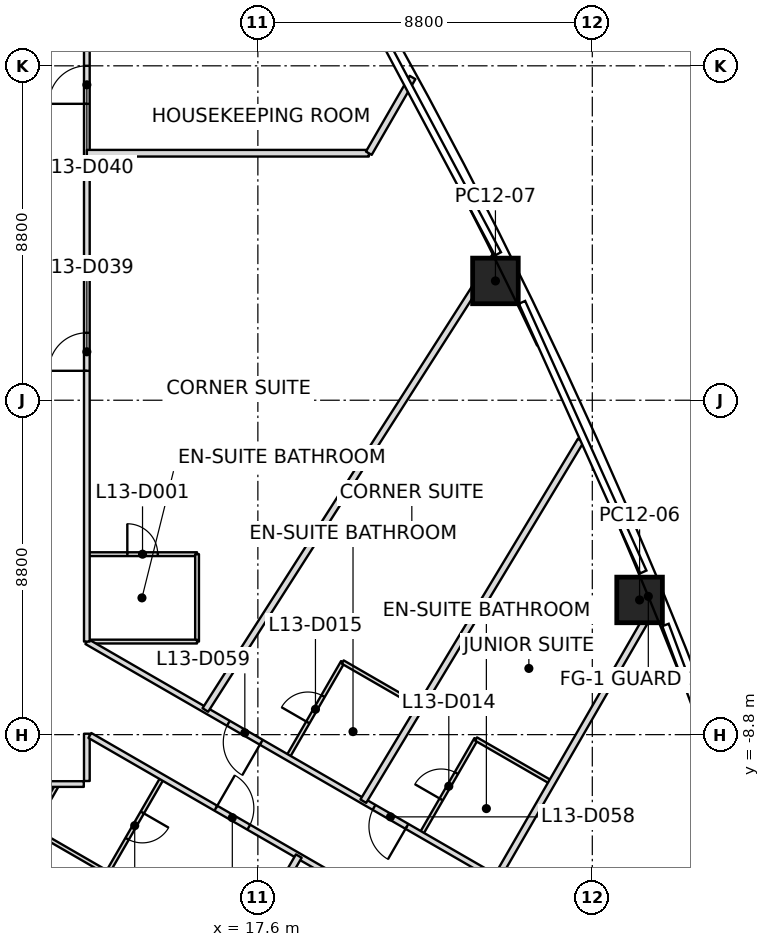
"""IFC4 building model, lengths in metres.
Left out: names, types, materials, properties, quantities, classifications, styles, units other than length and angle.
Written with IfcOpenShell. Run it as: python <this file> out.ifc"""

import sys

from ifc_helpers import new_model, si_unit, direction, frame, frame_2d, origin, origin_2d, place, context, subcontext, project, spatial, rectangle, extrude, element, fill, save


model = new_model("IFC4")
c1 = context("Model", 3, precision=1e-05, world=origin(), true_north=direction((0.0, 1.0)))
c2 = subcontext(c1, "Body", "Model", "MODEL_VIEW")
j1 = project(units=[si_unit("LENGTHUNIT", "METRE"), si_unit("PLANEANGLEUNIT", "RADIAN")], contexts=[c1])
p1 = place(None, origin())
s1 = spatial("IfcSite", under=j1, at=p1, CompositionType="ELEMENT")
p2 = place(p1, origin())
s2 = spatial("IfcBuilding", under=s1, at=p2, CompositionType="ELEMENT")
p3 = place(p2, frame((0.0, 0.0, 70.2)))
s3 = spatial("IfcBuildingStorey", under=s2, at=p3, CompositionType="ELEMENT", Elevation=70.2)
p4 = place(p3, frame((27.644, -5.255, 0.0), z_axis=(-0.019460655113, 0.011016709844, 0.999749926235), x_axis=(-0.381333758454, 0.9242697276, -0.017607819416)))
e1 = element("IfcColumn", 1, at=p4, inside=s3, PredefinedType="COLUMN", context=c2, shape_type="SweptSolid", body=[
    extrude(rectangle(XDim=1.2, YDim=1.2, at=origin_2d()), origin(), (0.0, 0.0, 1.0), 3.701),
])
p5 = place(p3, frame((23.851, 3.139, 0.0), z_axis=(-0.015306644787, 0.002309192102, 0.99988017995), x_axis=(-0.441616967633, 0.897160209643, -0.00883244763)))
e2 = element("IfcColumn", 2, at=p5, inside=s3, PredefinedType="COLUMN", context=c2, shape_type="SweptSolid", body=[
    extrude(rectangle(XDim=1.2, YDim=1.2, at=origin_2d()), origin(), (0.0, 0.0, 1.0), 3.7),
])
p6 = place(p3, frame((18.677, -11.995, 0.0), z_axis=(0.0, 0.0, 1.0), x_axis=(-0.499997843529, -0.86602664882, 0.0)))
e3 = element("IfcWall", 3, at=p6, inside=s3, PredefinedType="PARTITIONING", context=c2, shape_type="SweptSolid", body=[
    extrude(rectangle(XDim=11.153, YDim=0.175, at=frame_2d((5.576, 0.0))), origin(), (0.0, 0.0, 1.0), 3.0),
])
p7 = place(p3, frame((13.1, 6.5, 0.0), z_axis=(0.0, 0.0, 1.0), x_axis=(1.0, 0.0, 0.0)))
e4 = element("IfcWall", 4, at=p7, inside=s3, PredefinedType="PARTITIONING", context=c2, shape_type="SweptSolid", body=[
    extrude(rectangle(XDim=7.419, YDim=0.175, at=frame_2d((3.709, 0.0))), origin(), (0.0, 0.0, 1.0), 3.0),
])
p8 = place(p3, frame((20.519, 6.5, 0.0), z_axis=(0.0, 0.0, 1.0), x_axis=(0.500040764516, 0.866001867101, 0.0)))
e5 = element("IfcWall", 5, at=p8, inside=s3, PredefinedType="PARTITIONING", context=c2, shape_type="SweptSolid", body=[
    extrude(rectangle(XDim=2.302, YDim=0.175, at=frame_2d((1.151, 0.0))), origin(), (0.0, 0.0, 1.0), 2.934),
])
p9 = place(p3, frame((23.851, 3.796, 0.0), z_axis=(0.0, 0.0, 1.0), x_axis=(-0.538388937406, -0.84269647684, 0.0)))
e6 = element("IfcWall", 6, at=p9, inside=s3, PredefinedType="PARTITIONING", context=c2, shape_type="SweptSolid", body=[
    extrude(rectangle(XDim=14.177, YDim=0.175, at=frame_2d((7.089, 0.0))), origin(), (0.0, 0.0, 1.0), 2.947),
])
p10 = place(p3, frame((20.375, -10.551, 0.0), z_axis=(0.0, 0.0, 1.0), x_axis=(0.51624063177, 0.856443582561, 0.0)))
e7 = element("IfcWall", 7, at=p10, inside=s3, PredefinedType="PARTITIONING", context=c2, shape_type="SweptSolid", body=[
    extrude(rectangle(XDim=11.084, YDim=0.175, at=frame_2d((5.542, 0.0))), origin(), (0.0, 0.0, 1.0), 2.934),
])
p11 = place(p3, frame((23.883, -12.577, 0.0), z_axis=(0.0, 0.0, 1.0), x_axis=(0.500021453979, 0.866013016969, 0.0)))
e8 = element("IfcWall", 8, at=p11, inside=s3, PredefinedType="PARTITIONING", context=c2, shape_type="SweptSolid", body=[
    extrude(rectangle(XDim=8.576, YDim=0.175, at=frame_2d((4.288, 0.0))), origin(), (0.0, 0.0, 1.0), 2.934),
])
p12 = place(p3, frame((-13.02, -10.1, 0.0), z_axis=(0.0, 0.0, 1.0), x_axis=(1.0, 0.0, 0.0)))
e9 = element("IfcWall", 9, at=p12, inside=s3, PredefinedType="PARTITIONING", context=c2, shape_type="SweptSolid", body=[
    extrude(rectangle(XDim=26.04, YDim=0.15, at=frame_2d((13.02, 0.0))), origin(), (0.0, 0.0, 1.0), 2.797),
])
p13 = place(p12, frame((7.32, 0.0, 0.0)))
e10 = element("IfcOpeningElement", 10, at=p13, cuts=e9, PredefinedType="OPENING", context=c2, shape_type="SweptSolid", body=[
    extrude(rectangle(XDim=1.0, YDim=2.1, at=frame_2d((0.5, 1.05))), frame((0.0, 0.075, 0.0), z_axis=(0.0, -1.0, 0.0), x_axis=(1.0, 0.0, 0.0)), (0.0, 0.0, 1.0), 0.15),
])
p14 = place(p12, frame((11.82, 0.0, 0.0)))
e11 = element("IfcOpeningElement", 11, at=p14, cuts=e9, PredefinedType="OPENING", context=c2, shape_type="SweptSolid", body=[
    extrude(rectangle(XDim=1.0, YDim=2.1, at=frame_2d((0.5, 1.05))), frame((0.0, 0.075, 0.0), z_axis=(0.0, -1.0, 0.0), x_axis=(1.0, 0.0, 0.0)), (0.0, 0.0, 1.0), 0.15),
])
p15 = place(p12, frame((14.82, 0.0, 0.0)))
e12 = element("IfcOpeningElement", 12, at=p15, cuts=e9, PredefinedType="OPENING", context=c2, shape_type="SweptSolid", body=[
    extrude(rectangle(XDim=1.0, YDim=2.1, at=frame_2d((0.5, 1.05))), frame((0.0, 0.075, 0.0), z_axis=(0.0, -1.0, 0.0), x_axis=(1.0, 0.0, 0.0)), (0.0, 0.0, 1.0), 0.15),
])
p16 = place(p12, frame((19.92, 0.0, 0.0)))
e13 = element("IfcOpeningElement", 13, at=p16, cuts=e9, PredefinedType="OPENING", context=c2, shape_type="SweptSolid", body=[
    extrude(rectangle(XDim=1.0, YDim=2.1, at=frame_2d((0.5, 1.05))), frame((0.0, 0.075, 0.0), z_axis=(0.0, -1.0, 0.0), x_axis=(1.0, 0.0, 0.0)), (0.0, 0.0, 1.0), 0.15),
])
p17 = place(p3, frame((13.1, -10.02, 0.0), z_axis=(0.0, 0.0, 1.0), x_axis=(0.0, 1.0, 0.0)))
e14 = element("IfcWall", 14, at=p17, inside=s3, PredefinedType="PARTITIONING", context=c2, shape_type="SweptSolid", body=[
    extrude(rectangle(XDim=1.244, YDim=0.15, at=frame_2d((0.622, 0.0))), origin(), (0.0, 0.0, 1.0), 2.797),
])
p18 = place(p3, frame((13.179, -8.822, 0.0), z_axis=(0.0, 0.0, 1.0), x_axis=(0.866032412198, -0.499987860876, 0.0)))
e15 = element("IfcWall", 15, at=p18, inside=s3, PredefinedType="PARTITIONING", context=c2, shape_type="SweptSolid", body=[
    extrude(rectangle(XDim=11.148, YDim=0.15, at=frame_2d((5.574, 0.0))), origin(), (0.0, 0.0, 1.0), 2.797),
])
p19 = place(p18, frame((3.828, 0.0, 0.0)))
e16 = element("IfcOpeningElement", 16, at=p19, cuts=e15, PredefinedType="OPENING", context=c2, shape_type="SweptSolid", body=[
    extrude(rectangle(XDim=1.0, YDim=2.1, at=frame_2d((0.5, 1.05))), frame((0.0, 0.075, 0.0), z_axis=(0.0, -1.0, 0.0), x_axis=(1.0, 0.0, 0.0)), (0.0, 0.0, 1.0), 0.15),
])
p20 = place(p18, frame((9.448, 0.0, 0.0)))
e17 = element("IfcOpeningElement", 17, at=p20, cuts=e15, PredefinedType="OPENING", context=c2, shape_type="SweptSolid", body=[
    extrude(rectangle(XDim=1.0, YDim=2.1, at=frame_2d((0.5, 1.05))), frame((0.0, 0.075, 0.0), z_axis=(0.0, -1.0, 0.0), x_axis=(1.0, 0.0, 0.0)), (0.0, 0.0, 1.0), 0.15),
])
p21 = place(p3, frame((23.814, -12.537, 0.0), z_axis=(0.0, 0.0, 1.0), x_axis=(-0.86602554532, 0.499999754854, 0.0)))
e18 = element("IfcWall", 18, at=p21, inside=s3, PredefinedType="PARTITIONING", context=c2, shape_type="SweptSolid", body=[
    extrude(rectangle(XDim=12.372, YDim=0.15, at=frame_2d((6.186, 0.0))), origin(), (0.0, 0.0, 1.0), 2.947),
])
p22 = place(p21, frame((2.646, 0.0, 0.0)))
e19 = element("IfcOpeningElement", 19, at=p22, cuts=e18, PredefinedType="OPENING", context=c2, shape_type="SweptSolid", body=[
    extrude(rectangle(XDim=1.0, YDim=2.1, at=frame_2d((0.5, 1.05))), frame((0.0, 0.075, 0.0), z_axis=(0.0, -1.0, 0.0), x_axis=(1.0, 0.0, 0.0)), (0.0, 0.0, 1.0), 0.15),
])
p23 = place(p21, frame((7.072, 0.0, 0.0)))
e20 = element("IfcOpeningElement", 20, at=p23, cuts=e18, PredefinedType="OPENING", context=c2, shape_type="SweptSolid", body=[
    extrude(rectangle(XDim=1.0, YDim=2.1, at=frame_2d((0.5, 1.05))), frame((0.0, 0.075, 0.0), z_axis=(0.0, -1.0, 0.0), x_axis=(1.0, 0.0, 0.0)), (0.0, 0.0, 1.0), 0.15),
])
p24 = place(p3, frame((13.1, -6.351, 0.0), z_axis=(0.0, 0.0, 1.0), x_axis=(0.0, 1.0, 0.0)))
e21 = element("IfcWall", 21, at=p24, inside=s3, PredefinedType="PARTITIONING", context=c2, shape_type="SweptSolid", body=[
    extrude(rectangle(XDim=16.371, YDim=0.15, at=frame_2d((8.186, 0.0))), origin(), (0.0, 0.0, 1.0), 3.0),
])
p25 = place(p24, frame((7.125, 0.0, 0.0)))
e22 = element("IfcOpeningElement", 22, at=p25, cuts=e21, PredefinedType="OPENING", context=c2, shape_type="SweptSolid", body=[
    extrude(rectangle(XDim=1.0, YDim=2.1, at=frame_2d((0.5, 1.05))), frame((0.0, 0.075, 0.0), z_axis=(0.0, -1.0, 0.0), x_axis=(1.0, 0.0, 0.0)), (0.0, 0.0, 1.0), 0.15),
])
p26 = place(p24, frame((14.151, 0.0, 0.0)))
e23 = element("IfcOpeningElement", 23, at=p26, cuts=e21, PredefinedType="OPENING", context=c2, shape_type="SweptSolid", body=[
    extrude(rectangle(XDim=1.0, YDim=2.1, at=frame_2d((0.5, 1.05))), frame((0.0, 0.075, 0.0), z_axis=(0.0, -1.0, 0.0), x_axis=(1.0, 0.0, 0.0)), (0.0, 0.0, 1.0), 0.15),
])
p27 = place(p3, frame((15.077, -9.952, 0.0), z_axis=(0.0, 0.0, 1.0), x_axis=(-0.499999802827, -0.866025517622, 0.0)))
e24 = element("IfcWall", 24, at=p27, inside=s3, PredefinedType="PARTITIONING", context=c2, shape_type="SweptSolid", body=[
    extrude(rectangle(XDim=2.87, YDim=0.1, at=frame_2d((1.435, 0.0))), origin(), (0.0, 0.0, 1.0), 2.797),
])
p28 = place(p27, frame((1.035, 0.0, 0.0)))
e25 = element("IfcOpeningElement", 25, at=p28, cuts=e24, PredefinedType="OPENING", context=c2, shape_type="SweptSolid", body=[
    extrude(rectangle(XDim=0.8, YDim=2.1, at=frame_2d((0.4, 1.05))), frame((0.0, 0.05, 0.0), z_axis=(0.0, -1.0, 0.0), x_axis=(1.0, 0.0, 0.0)), (0.0, 0.0, 1.0), 0.1),
])
p29 = place(p3, frame((13.642, -12.437, 0.0), z_axis=(0.0, 0.0, 1.0), x_axis=(-0.866007057882, 0.500031774688, 0.0)))
e26 = element("IfcWall", 26, at=p29, inside=s3, PredefinedType="PARTITIONING", context=c2, shape_type="SweptSolid", body=[
    extrude(rectangle(XDim=2.3, YDim=0.1, at=frame_2d((1.15, 0.0))), origin(), (0.0, 0.0, 1.0), 2.867),
])
p30 = place(p3, frame((11.65, -11.287, 0.0), z_axis=(0.0, 0.0, 1.0), x_axis=(0.500049290317, 0.865996944136, 0.0)))
e27 = element("IfcWall", 27, at=p30, inside=s3, PredefinedType="PARTITIONING", context=c2, shape_type="SweptSolid", body=[
    extrude(rectangle(XDim=1.336, YDim=0.1, at=frame_2d((0.668, 0.0))), origin(), (0.0, 0.0, 1.0), 3.0),
])
p31 = place(p3, frame((13.13, -4.051, 0.0), z_axis=(0.0, 0.0, 1.0), x_axis=(1.0, 0.0, 0.0)))
e28 = element("IfcWall", 28, at=p31, inside=s3, PredefinedType="PARTITIONING", context=c2, shape_type="SweptSolid", body=[
    extrude(rectangle(XDim=2.87, YDim=0.1, at=frame_2d((1.435, 0.0))), origin(), (0.0, 0.0, 1.0), 3.0),
])
p32 = place(p31, frame((1.035, 0.0, 0.0)))
e29 = element("IfcOpeningElement", 29, at=p32, cuts=e28, PredefinedType="OPENING", context=c2, shape_type="SweptSolid", body=[
    extrude(rectangle(XDim=0.8, YDim=2.1, at=frame_2d((0.4, 1.05))), frame((0.0, 0.05, 0.0), z_axis=(0.0, -1.0, 0.0), x_axis=(1.0, 0.0, 0.0)), (0.0, 0.0, 1.0), 0.1),
])
p33 = place(p3, frame((16.0, -4.051, 0.0), z_axis=(0.0, 0.0, 1.0), x_axis=(0.0, -1.0, 0.0)))
e30 = element("IfcWall", 30, at=p33, inside=s3, PredefinedType="PARTITIONING", context=c2, shape_type="SweptSolid", body=[
    extrude(rectangle(XDim=2.3, YDim=0.1, at=frame_2d((1.15, 0.0))), origin(), (0.0, 0.0, 1.0), 2.947),
])
p34 = place(p3, frame((16.0, -6.351, 0.0), z_axis=(0.0, 0.0, 1.0), x_axis=(-1.0, 0.0, 0.0)))
e31 = element("IfcWall", 31, at=p34, inside=s3, PredefinedType="PARTITIONING", context=c2, shape_type="SweptSolid", body=[
    extrude(rectangle(XDim=2.84, YDim=0.1, at=frame_2d((1.42, 0.0))), origin(), (0.0, 0.0, 1.0), 2.947),
])
p35 = place(p3, frame((18.398, -9.375, 0.0), z_axis=(0.0, 0.0, 1.0), x_axis=(0.499999802827, 0.866025517622, 0.0)))
e32 = element("IfcWall", 32, at=p35, inside=s3, PredefinedType="PARTITIONING", context=c2, shape_type="SweptSolid", body=[
    extrude(rectangle(XDim=2.87, YDim=0.1, at=frame_2d((1.435, 0.0))), origin(), (0.0, 0.0, 1.0), 3.0),
])
p36 = place(p35, frame((1.035, 0.0, 0.0)))
e33 = element("IfcOpeningElement", 33, at=p36, cuts=e32, PredefinedType="OPENING", context=c2, shape_type="SweptSolid", body=[
    extrude(rectangle(XDim=0.8, YDim=2.1, at=frame_2d((0.4, 1.05))), frame((0.0, 0.05, 0.0), z_axis=(0.0, -1.0, 0.0), x_axis=(1.0, 0.0, 0.0)), (0.0, 0.0, 1.0), 0.1),
])
p37 = place(p3, frame((19.833, -6.889, 0.0), z_axis=(0.0, 0.0, 1.0), x_axis=(0.866017224141, -0.500014167291, 0.0)))
e34 = element("IfcWall", 34, at=p37, inside=s3, PredefinedType="PARTITIONING", context=c2, shape_type="SweptSolid", body=[
    extrude(rectangle(XDim=2.27, YDim=0.1, at=frame_2d((1.135, 0.0))), origin(), (0.0, 0.0, 1.0), 3.0),
])
p38 = place(p3, frame((21.906, -11.401, 0.0), z_axis=(0.0, 0.0, 1.0), x_axis=(0.500036638401, 0.866004249561, 0.0)))
e35 = element("IfcWall", 35, at=p38, inside=s3, PredefinedType="PARTITIONING", context=c2, shape_type="SweptSolid", body=[
    extrude(rectangle(XDim=2.87, YDim=0.1, at=frame_2d((1.435, 0.0))), origin(), (0.0, 0.0, 1.0), 3.0),
])
p39 = place(p38, frame((1.035, 0.0, 0.0)))
e36 = element("IfcOpeningElement", 36, at=p39, cuts=e35, PredefinedType="OPENING", context=c2, shape_type="SweptSolid", body=[
    extrude(rectangle(XDim=0.8, YDim=2.1, at=frame_2d((0.4, 1.05))), frame((0.0, 0.05, 0.0), z_axis=(0.0, -1.0, 0.0), x_axis=(1.0, 0.0, 0.0)), (0.0, 0.0, 1.0), 0.1),
])
p40 = place(p3, frame((23.342, -8.915, 0.0), z_axis=(0.0, 0.0, 1.0), x_axis=(0.866044110172, -0.499967598186, 0.0)))
e37 = element("IfcWall", 37, at=p40, inside=s3, PredefinedType="PARTITIONING", context=c2, shape_type="SweptSolid", body=[
    extrude(rectangle(XDim=2.27, YDim=0.1, at=frame_2d((1.135, 0.0))), origin(), (0.0, 0.0, 1.0), 3.0),
])
p41 = place(p25, origin())
e38 = element("IfcDoor", 38, at=p41, inside=s3, OperationType="SINGLE_SWING_LEFT", PredefinedType="DOOR", context=c2, shape_type="SweptSolid", body=[
    extrude(rectangle(XDim=1.0, YDim=2.1, at=frame_2d((0.5, 1.05))), frame((0.0, 0.025, 0.0), z_axis=(0.0, -1.0, 0.0), x_axis=(1.0, 0.0, 0.0)), (0.0, 0.0, 1.0), 0.05),
])
fill(e22, e38)
p42 = place(p32, origin())
e39 = element("IfcDoor", 39, at=p42, inside=s3, OperationType="SINGLE_SWING_RIGHT", PredefinedType="DOOR", context=c2, shape_type="SweptSolid", body=[
    extrude(rectangle(XDim=0.8, YDim=2.1, at=frame_2d((0.4, 1.05))), frame((0.0, 0.025, 0.0), z_axis=(0.0, -1.0, 0.0), x_axis=(1.0, 0.0, 0.0)), (0.0, 0.0, 1.0), 0.05),
])
fill(e29, e39)
p43 = place(p26, origin())
e40 = element("IfcDoor", 40, at=p43, inside=s3, OperationType="SINGLE_SWING_RIGHT", PredefinedType="DOOR", context=c2, shape_type="SweptSolid", body=[
    extrude(rectangle(XDim=1.0, YDim=2.1, at=frame_2d((0.5, 1.05))), frame((0.0, 0.025, 0.0), z_axis=(0.0, -1.0, 0.0), x_axis=(1.0, 0.0, 0.0)), (0.0, 0.0, 1.0), 0.05),
])
fill(e23, e40)
p44 = place(p19, origin())
e41 = element("IfcDoor", 41, at=p44, inside=s3, OperationType="SINGLE_SWING_LEFT", PredefinedType="DOOR", context=c2, shape_type="SweptSolid", body=[
    extrude(rectangle(XDim=1.0, YDim=2.1, at=frame_2d((0.5, 1.05))), frame((0.0, 0.025, 0.0), z_axis=(0.0, -1.0, 0.0), x_axis=(1.0, 0.0, 0.0)), (0.0, 0.0, 1.0), 0.05),
])
fill(e16, e41)
p45 = place(p28, origin())
e42 = element("IfcDoor", 42, at=p45, inside=s3, OperationType="SINGLE_SWING_LEFT", PredefinedType="DOOR", context=c2, shape_type="SweptSolid", body=[
    extrude(rectangle(XDim=0.8, YDim=2.1, at=frame_2d((0.4, 1.05))), frame((0.0, 0.025, 0.0), z_axis=(0.0, -1.0, 0.0), x_axis=(1.0, 0.0, 0.0)), (0.0, 0.0, 1.0), 0.05),
])
fill(e25, e42)
p46 = place(p22, origin())
e43 = element("IfcDoor", 43, at=p46, inside=s3, OperationType="SINGLE_SWING_LEFT", PredefinedType="DOOR", context=c2, shape_type="SweptSolid", body=[
    extrude(rectangle(XDim=1.0, YDim=2.1, at=frame_2d((0.5, 1.05))), frame((0.0, 0.025, 0.0), z_axis=(0.0, -1.0, 0.0), x_axis=(1.0, 0.0, 0.0)), (0.0, 0.0, 1.0), 0.05),
])
fill(e19, e43)
p47 = place(p39, origin())
e44 = element("IfcDoor", 44, at=p47, inside=s3, OperationType="SINGLE_SWING_LEFT", PredefinedType="DOOR", context=c2, shape_type="SweptSolid", body=[
    extrude(rectangle(XDim=0.8, YDim=2.1, at=frame_2d((0.4, 1.05))), frame((0.0, 0.025, 0.0), z_axis=(0.0, -1.0, 0.0), x_axis=(1.0, 0.0, 0.0)), (0.0, 0.0, 1.0), 0.05),
])
fill(e36, e44)
p48 = place(p23, origin())
e45 = element("IfcDoor", 45, at=p48, inside=s3, OperationType="SINGLE_SWING_LEFT", PredefinedType="DOOR", context=c2, shape_type="SweptSolid", body=[
    extrude(rectangle(XDim=1.0, YDim=2.1, at=frame_2d((0.5, 1.05))), frame((0.0, 0.025, 0.0), z_axis=(0.0, -1.0, 0.0), x_axis=(1.0, 0.0, 0.0)), (0.0, 0.0, 1.0), 0.05),
])
fill(e20, e45)
p49 = place(p36, origin())
e46 = element("IfcDoor", 46, at=p49, inside=s3, OperationType="SINGLE_SWING_RIGHT", PredefinedType="DOOR", context=c2, shape_type="SweptSolid", body=[
    extrude(rectangle(XDim=0.8, YDim=2.1, at=frame_2d((0.4, 1.05))), frame((0.0, 0.025, 0.0), z_axis=(0.0, -1.0, 0.0), x_axis=(1.0, 0.0, 0.0)), (0.0, 0.0, 1.0), 0.05),
])
fill(e33, e46)
save(model, sys.argv[1])
